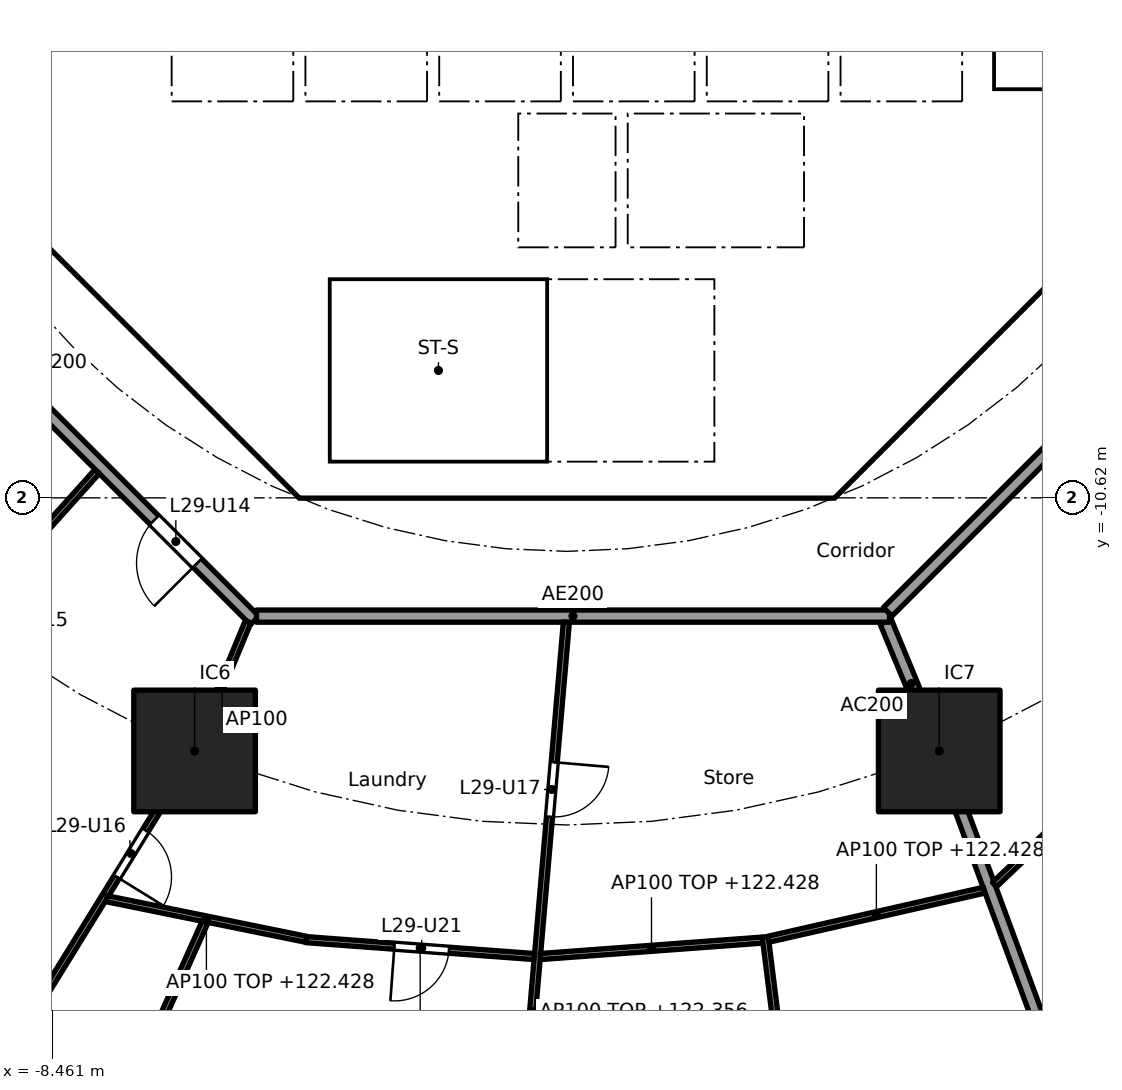
"""IFC4 building model, lengths in metres.
Left out: names, types, materials, properties, quantities, classifications, styles, units other than length and angle.
Written with IfcOpenShell. Run it as: python <this file> out.ifc"""

import sys

from ifc_helpers import new_model, si_unit, direction, frame, frame_2d, origin, origin_2d, place, context, subcontext, project, spatial, polyline, rectangle, outline, extrude, element, fill, save


model = new_model("IFC4")
c1 = context("Model", 3, precision=1e-05, world=origin(), true_north=direction((0.0, 1.0)))
c2 = subcontext(c1, "Body", "Model", "MODEL_VIEW")
j1 = project(units=[si_unit("LENGTHUNIT", "METRE"), si_unit("PLANEANGLEUNIT", "RADIAN")], contexts=[c1])
p1 = place(None, origin())
s1 = spatial("IfcSite", under=j1, at=p1, CompositionType="ELEMENT")
p2 = place(p1, origin())
s2 = spatial("IfcBuilding", under=s1, at=p2, CompositionType="ELEMENT")
p3 = place(p2, frame((0.0, 0.0, 119.6)))
s3 = spatial("IfcBuildingStorey", under=s2, at=p3, CompositionType="ELEMENT", Elevation=119.6)
for number, where, z_axis, x_axis in (
    (1, (-6.123, -14.782, 0.0), (0.0, 0.0, 1.0), (1.0, 0.0, 0.0)),
    (2, (6.123, -14.782, 0.0), (0.0, 0.0, 1.0), (1.0, 0.0, 0.0)),
):
    element("IfcColumn", number, at=place(p3, frame(where, z_axis=z_axis, x_axis=x_axis)), inside=s3, PredefinedType="COLUMN", context=c2, shape_type="SweptSolid", body=[
        extrude(rectangle(XDim=2.0, YDim=2.0, at=origin_2d()), origin(), (0.0, 0.0, 1.0), 3.7),
    ])
p4 = place(p3, frame((-9.988, -4.613, 0.0), z_axis=(0.0, 0.0, 1.0), x_axis=(0.707106781187, -0.707106781187, 0.0)))
e3 = element("IfcWall", 3, at=p4, inside=s3, PredefinedType="SHEAR", context=c2, shape_type="SweptSolid", body=[
    extrude(rectangle(XDim=7.602, YDim=0.6, at=frame_2d((3.801, 0.0))), origin(), (0.0, 0.0, 1.0), 3.44),
])
p5 = place(p4, frame((6.151, 0.0, 0.0)))
e4 = element("IfcOpeningElement", 4, at=p5, cuts=e3, PredefinedType="OPENING", context=c2, shape_type="SweptSolid", body=[
    extrude(rectangle(XDim=1.1, YDim=2.1, at=frame_2d((0.55, 1.05))), frame((0.0, 0.31, 0.0), z_axis=(0.0, -1.0, 0.0), x_axis=(1.0, 0.0, 0.0)), (0.0, 0.0, 1.0), 0.62),
])
p6 = place(p3, frame((4.613, -9.988, 0.0), z_axis=(0.0, 0.0, 1.0), x_axis=(0.707106781187, 0.707106781187, 0.0)))
e5 = element("IfcWall", 5, at=p6, inside=s3, PredefinedType="SHEAR", context=c2, shape_type="SweptSolid", body=[
    extrude(rectangle(XDim=7.602, YDim=0.6, at=frame_2d((3.801, 0.0))), origin(), (0.0, 0.0, 1.0), 3.44),
])
p7 = place(p6, frame((3.201, 0.0, 0.0)))
e6 = element("IfcOpeningElement", 6, at=p7, cuts=e5, PredefinedType="OPENING", context=c2, shape_type="SweptSolid", body=[
    extrude(rectangle(XDim=1.2, YDim=2.1, at=frame_2d((0.6, 1.05))), frame((0.0, 0.31, 0.0), z_axis=(0.0, -1.0, 0.0), x_axis=(1.0, 0.0, 0.0)), (0.0, 0.0, 1.0), 0.62),
])
p8 = place(p3, frame((4.0, -10.025, 0.0), z_axis=(0.0, 0.0, 1.0), x_axis=(0.0, 1.0, 0.0)))
e7 = element("IfcWall", 7, at=p8, inside=s3, PredefinedType="SOLIDWALL", context=c2, shape_type="SweptSolid", body=[
    extrude(rectangle(XDim=3.0, YDim=0.2, at=frame_2d((1.5, 0.0))), origin(), (0.0, 0.0, 1.0), 3.44),
])
p9 = place(p8, frame((0.975, 0.0, 0.0)))
e8 = element("IfcOpeningElement", 8, at=p9, cuts=e7, PredefinedType="OPENING", context=c2, shape_type="SweptSolid", body=[
    extrude(rectangle(XDim=1.1, YDim=2.1, at=frame_2d((0.55, 1.05))), frame((0.0, 0.11, 0.0), z_axis=(0.0, -1.0, 0.0), x_axis=(1.0, 0.0, 0.0)), (0.0, 0.0, 1.0), 0.22),
])
p10 = place(p3, frame((-5.8, -8.227, 0.0), z_axis=(0.0, 0.0, 1.0), x_axis=(0.0, 1.0, 0.0)))
e9 = element("IfcWall", 9, at=p10, inside=s3, PredefinedType="PARTITIONING", context=c2, shape_type="SweptSolid", body=[
    extrude(rectangle(XDim=3.927, YDim=0.15, at=frame_2d((1.963, 0.0))), origin(), (0.0, 0.0, 1.0), 3.44),
])
p11 = place(p10, frame((1.476, 0.0, 0.0)))
e10 = element("IfcOpeningElement", 10, at=p11, cuts=e9, PredefinedType="OPENING", context=c2, shape_type="SweptSolid", body=[
    extrude(rectangle(XDim=0.9, YDim=2.1, at=frame_2d((0.45, 1.05))), frame((0.0, 0.085, 0.0), z_axis=(0.0, -1.0, 0.0), x_axis=(1.0, 0.0, 0.0)), (0.0, 0.0, 1.0), 0.17),
])
p12 = place(p3, frame((4.0, -6.5, 0.0), z_axis=(0.0, 0.0, 1.0), x_axis=(0.0, 1.0, 0.0)))
e11 = element("IfcWall", 11, at=p12, inside=s3, PredefinedType="SOLIDWALL", context=c2, shape_type="SweptSolid", body=[
    extrude(rectangle(XDim=2.2, YDim=0.2, at=frame_2d((1.1, 0.0))), origin(), (0.0, 0.0, 1.0), 3.44),
])
p13 = place(p12, frame((0.55, 0.0, 0.0)))
e12 = element("IfcOpeningElement", 12, at=p13, cuts=e11, PredefinedType="OPENING", context=c2, shape_type="SweptSolid", body=[
    extrude(rectangle(XDim=1.1, YDim=2.1, at=frame_2d((0.55, 1.05))), frame((0.0, 0.11, 0.0), z_axis=(0.0, -1.0, 0.0), x_axis=(1.0, 0.0, 0.0)), (0.0, 0.0, 1.0), 0.22),
])
p14 = place(p3, frame((-4.0, -6.5, 0.0), z_axis=(0.0, 0.0, 1.0), x_axis=(0.0, 1.0, 0.0)))
e13 = element("IfcWall", 13, at=p14, inside=s3, PredefinedType="SOLIDWALL", context=c2, shape_type="SweptSolid", body=[
    extrude(rectangle(XDim=2.2, YDim=0.2, at=frame_2d((1.1, 0.0))), origin(), (0.0, 0.0, 1.0), 3.44),
])
p15 = place(p14, frame((0.65, 0.0, 0.0)))
e14 = element("IfcOpeningElement", 14, at=p15, cuts=e13, PredefinedType="OPENING", context=c2, shape_type="SweptSolid", body=[
    extrude(rectangle(XDim=0.9, YDim=2.1, at=frame_2d((0.45, 1.05))), frame((0.0, 0.11, 0.0), z_axis=(0.0, -1.0, 0.0), x_axis=(1.0, 0.0, 0.0)), (0.0, 0.0, 1.0), 0.22),
])
p16 = place(p3, origin())
e15 = element("IfcWall", 15, at=p16, inside=s3, PredefinedType="SHEAR", context=c2, shape_type="SweptSolid", body=[
    extrude(outline(polyline([(-4.152, -10.025), (4.152, -10.025), (4.401, -9.776), (4.825, -10.2), (4.401, -10.625), (-4.401, -10.625), (-4.825, -10.2), (-4.401, -9.776), (-4.152, -10.025)])), origin(), (0.0, 0.0, 1.0), 3.44),
])
for number, where, z_axis, x_axis in (
    (16, (-0.9, -6.5, 0.0), (0.0, 0.0, 1.0), (0.0, 1.0, 0.0)),
    (17, (0.9, -6.5, 0.0), (0.0, 0.0, 1.0), (0.0, 1.0, 0.0)),
):
    element("IfcWall", number, at=place(p3, frame(where, z_axis=z_axis, x_axis=x_axis)), inside=s3, PredefinedType="SOLIDWALL", context=c2, shape_type="SweptSolid", body=[
        extrude(rectangle(XDim=2.2, YDim=0.2, at=frame_2d((1.1, 0.0))), origin(), (0.0, 0.0, 1.0), 3.44),
    ])
p17 = place(p3, origin())
e18 = element("IfcWall", 18, at=p17, inside=s3, PredefinedType="SOLIDWALL", context=c2, shape_type="SweptSolid", body=[
    extrude(outline(polyline([(-6.7, -2.1), (-6.5, -2.1), (-6.5, -4.1), (-4.5, -4.1), (-4.5, -2.1), (-4.3, -2.1), (-4.3, -4.1), (-2.3, -4.1), (-2.3, -2.1), (-2.1, -2.1), (-2.1, -4.1), (-0.1, -4.1), (-0.1, -2.1), (0.1, -2.1), (0.1, -4.1), (2.1, -4.1), (2.1, -2.1), (2.3, -2.1), (2.3, -4.1), (4.3, -4.1), (4.3, -2.1), (4.5, -2.1), (4.5, -4.1), (6.5, -4.1), (6.5, -2.1), (6.7, -2.1), (6.7, -4.3), (-6.7, -4.3), (-6.7, -2.1)])), origin(), (0.0, 0.0, 1.0), 3.44),
])
p18 = place(p3, frame((-10.025, -4.0, 0.0), z_axis=(0.0, 0.0, 1.0), x_axis=(1.0, 0.0, 0.0)))
e19 = element("IfcWall", 19, at=p18, inside=s3, PredefinedType="PARTITIONING", context=c2, shape_type="SweptSolid", body=[
    extrude(rectangle(XDim=3.325, YDim=0.2, at=frame_2d((1.662, 0.0))), origin(), (0.0, 0.0, 1.0), 3.44),
])
p19 = place(p3, origin())
e20 = element("IfcWall", 20, at=p19, inside=s3, PredefinedType="SOLIDWALL", context=c2, shape_type="SweptSolid", body=[
    extrude(outline(polyline([(-3.9, -10.025), (-4.1, -10.025), (-4.1, -7.025), (-3.9, -7.025), (-3.9, -10.025)])), origin(), (0.0, 0.0, 1.0), 3.44),
])
p20 = place(p3, origin())
e21 = element("IfcWall", 21, at=p20, inside=s3, PredefinedType="SOLIDWALL", context=c2, shape_type="SweptSolid", body=[
    extrude(outline(polyline([(4.1, -7.025), (-4.1, -7.025), (-4.1, -6.5), (4.1, -6.5), (4.1, -7.025)])), origin(), (0.0, 0.0, 1.0), 3.44),
])
p21 = place(p3, origin())
e22 = element("IfcWall", 22, at=p21, inside=s3, PredefinedType="SOLIDWALL", context=c2, shape_type="SweptSolid", body=[
    extrude(outline(polyline([(7.025, -3.9), (6.7, -3.9), (6.7, 3.9), (7.025, 3.9), (7.025, -3.9)])), origin(), (0.0, 0.0, 1.0), 3.44),
])
p22 = place(p3, origin())
e23 = element("IfcWall", 23, at=p22, inside=s3, PredefinedType="SOLIDWALL", context=c2, shape_type="SweptSolid", body=[
    extrude(outline(polyline([(10.025, -4.1), (6.7, -4.1), (6.7, -3.9), (10.025, -3.9), (10.025, -4.1)])), origin(), (0.0, 0.0, 1.0), 3.44),
])
p23 = place(p3, frame((5.243, -12.657, 0.0), z_axis=(0.0, 0.0, 1.0), x_axis=(0.38273085373, -0.923859888513, 0.0)))
e24 = element("IfcWall", 24, at=p23, inside=s3, PredefinedType="PARTITIONING", context=c2, shape_type="SweptSolid", body=[
    extrude(rectangle(XDim=2.199, YDim=0.2, at=frame_2d((1.1, 0.0))), origin(), (0.0, 0.0, 1.0), 3.44),
])
p24 = place(p3, frame((6.14, -14.829, 0.0), z_axis=(0.0, 0.0, 1.0), x_axis=(0.346169582481, -0.938171956608, 0.0)))
e25 = element("IfcWall", 25, at=p24, inside=s3, PredefinedType="PARTITIONING", context=c2, shape_type="SweptSolid", body=[
    extrude(rectangle(XDim=14.354, YDim=0.2, at=frame_2d((7.177, 0.0))), origin(), (0.0, 0.0, 1.0), 2.828),
])
p25 = place(p3, frame((-12.635, -5.134, 0.0), z_axis=(0.0, 0.0, 1.0), x_axis=(0.707106781187, -0.707106781187, 0.0)))
e26 = element("IfcWall", 26, at=p25, inside=s3, PredefinedType="PARTITIONING", context=c2, shape_type="SweptSolid", body=[
    extrude(rectangle(XDim=10.609, YDim=0.2, at=frame_2d((5.305, 0.0))), origin(), (0.0, 0.0, 1.0), 3.44),
])
p26 = place(p25, frame((8.274, 0.0, 0.0)))
e27 = element("IfcOpeningElement", 27, at=p26, cuts=e26, PredefinedType="OPENING", context=c2, shape_type="SweptSolid", body=[
    extrude(rectangle(XDim=1.0, YDim=2.1, at=frame_2d((0.5, 1.05))), frame((0.0, 0.11, 0.0), z_axis=(0.0, -1.0, 0.0), x_axis=(1.0, 0.0, 0.0)), (0.0, 0.0, 1.0), 0.22),
])
p27 = place(p3, frame((-5.104, -12.565, 0.0), z_axis=(0.0, 0.0, 1.0), x_axis=(1.0, 0.0, 0.0)))
e28 = element("IfcWall", 28, at=p27, inside=s3, PredefinedType="PARTITIONING", context=c2, shape_type="SweptSolid", body=[
    extrude(rectangle(XDim=10.409, YDim=0.2, at=frame_2d((5.205, 0.0))), origin(), (0.0, 0.0, 1.0), 3.44),
])
p28 = place(p3, frame((5.275, -12.494, 0.0), z_axis=(0.0, 0.0, 1.0), x_axis=(0.707106781187, 0.707106781187, 0.0)))
e29 = element("IfcWall", 29, at=p28, inside=s3, PredefinedType="PARTITIONING", context=c2, shape_type="SweptSolid", body=[
    extrude(rectangle(XDim=10.409, YDim=0.2, at=frame_2d((5.205, 0.0))), origin(), (0.0, 0.0, 1.0), 3.44),
])
p29 = place(p3, frame((-7.725, -10.186, 0.0), z_axis=(0.0, 0.0, 1.0), x_axis=(-0.668498346565, -0.743713628112, 0.0)))
e30 = element("IfcWall", 30, at=p29, inside=s3, PredefinedType="PARTITIONING", context=c2, shape_type="SweptSolid", body=[
    extrude(rectangle(XDim=11.919, YDim=0.1, at=frame_2d((5.959, 0.0))), origin(), (0.0, 0.0, 1.0), 2.756),
])
p30 = place(p29, frame((2.106, 0.0, 0.0)))
e31 = element("IfcOpeningElement", 31, at=p30, cuts=e30, PredefinedType="OPENING", context=c2, shape_type="SweptSolid", body=[
    extrude(rectangle(XDim=0.9, YDim=2.1, at=frame_2d((0.45, 1.05))), frame((0.0, 0.06, 0.0), z_axis=(0.0, -1.0, 0.0), x_axis=(1.0, 0.0, 0.0)), (0.0, 0.0, 1.0), 0.12),
])
p31 = place(p29, frame((8.041, 0.0, 0.0)))
e32 = element("IfcOpeningElement", 32, at=p31, cuts=e30, PredefinedType="OPENING", context=c2, shape_type="SweptSolid", body=[
    extrude(rectangle(XDim=0.9, YDim=2.1, at=frame_2d((0.45, 1.05))), frame((0.0, 0.06, 0.0), z_axis=(0.0, -1.0, 0.0), x_axis=(1.0, 0.0, 0.0)), (0.0, 0.0, 1.0), 0.12),
])
p32 = place(p3, frame((-5.243, -12.657, 0.0), z_axis=(0.0, 0.0, 1.0), x_axis=(-0.382811769845, -0.923826362943, 0.0)))
e33 = element("IfcWall", 33, at=p32, inside=s3, PredefinedType="PARTITIONING", context=c2, shape_type="SweptSolid", body=[
    extrude(rectangle(XDim=2.25, YDim=0.1, at=frame_2d((1.125, 0.0))), origin(), (0.0, 0.0, 1.0), 3.44),
])
p33 = place(p3, frame((-6.149, -14.825, 0.0), z_axis=(0.0, 0.0, 1.0), x_axis=(-0.525396393596, -0.850857584791, 0.0)))
e34 = element("IfcWall", 34, at=p33, inside=s3, PredefinedType="PARTITIONING", context=c2, shape_type="SweptSolid", body=[
    extrude(rectangle(XDim=9.643, YDim=0.1, at=frame_2d((4.822, 0.0))), origin(), (0.0, 0.0, 1.0), 3.44),
])
p34 = place(p33, frame((1.485, 0.0, 0.0)))
e35 = element("IfcOpeningElement", 35, at=p34, cuts=e34, PredefinedType="OPENING", context=c2, shape_type="SweptSolid", body=[
    extrude(rectangle(XDim=0.9, YDim=2.1, at=frame_2d((0.45, 1.05))), frame((0.0, 0.06, 0.0), z_axis=(0.0, -1.0, 0.0), x_axis=(1.0, 0.0, 0.0)), (0.0, 0.0, 1.0), 0.12),
])
p35 = place(p33, frame((5.744, 0.0, 0.0)))
e36 = element("IfcOpeningElement", 36, at=p35, cuts=e34, PredefinedType="OPENING", context=c2, shape_type="SweptSolid", body=[
    extrude(rectangle(XDim=0.9, YDim=2.1, at=frame_2d((0.45, 1.05))), frame((0.0, 0.06, 0.0), z_axis=(0.0, -1.0, 0.0), x_axis=(1.0, 0.0, 0.0)), (0.0, 0.0, 1.0), 0.12),
])
p36 = place(p3, frame((-7.568, -17.212, 0.0), z_axis=(0.0, 0.0, 1.0), x_axis=(0.979967079473, -0.199159541946, 0.0)))
e37 = element("IfcWall", 37, at=p36, inside=s3, PredefinedType="PARTITIONING", context=c2, shape_type="SweptSolid", body=[
    extrude(rectangle(XDim=3.347, YDim=0.1, at=frame_2d((1.673, 0.0))), origin(), (0.0, 0.0, 1.0), 2.828),
])
p37 = place(p3, frame((-5.949, -17.591, 0.0), z_axis=(0.0, 0.0, 1.0), x_axis=(-0.40838467696, -0.912809923053, 0.0)))
e38 = element("IfcWall", 38, at=p37, inside=s3, PredefinedType="PARTITIONING", context=c2, shape_type="SweptSolid", body=[
    extrude(rectangle(XDim=14.665, YDim=0.1, at=frame_2d((7.333, 0.0))), origin(), (0.0, 0.0, 1.0), 2.905),
])
p38 = place(p37, frame((10.334, 0.0, 0.0)))
e39 = element("IfcOpeningElement", 39, at=p38, cuts=e38, PredefinedType="OPENING", context=c2, shape_type="SweptSolid", body=[
    extrude(rectangle(XDim=0.9, YDim=2.1, at=frame_2d((0.45, 1.05))), frame((0.0, 0.06, 0.0), z_axis=(0.0, -1.0, 0.0), x_axis=(1.0, 0.0, 0.0)), (0.0, 0.0, 1.0), 0.12),
])
p39 = place(p3, frame((-4.29, -17.885, 0.0), z_axis=(0.0, 0.0, 1.0), x_axis=(0.997272353708, -0.073809569363, 0.0)))
e40 = element("IfcWall", 40, at=p39, inside=s3, PredefinedType="PARTITIONING", context=c2, shape_type="SweptSolid", body=[
    extrude(rectangle(XDim=3.764, YDim=0.1, at=frame_2d((1.882, 0.0))), origin(), (0.0, 0.0, 1.0), 2.828),
])
p40 = place(p39, frame((1.457, 0.0, 0.0)))
e41 = element("IfcOpeningElement", 41, at=p40, cuts=e40, PredefinedType="OPENING", context=c2, shape_type="SweptSolid", body=[
    extrude(rectangle(XDim=0.9, YDim=2.1, at=frame_2d((0.45, 1.05))), frame((0.0, 0.06, 0.0), z_axis=(0.0, -1.0, 0.0), x_axis=(1.0, 0.0, 0.0)), (0.0, 0.0, 1.0), 0.12),
])
p41 = place(p3, frame((-0.009, -12.664, 0.0), z_axis=(0.0, 0.0, 1.0), x_axis=(-0.086441225464, -0.996256952066, 0.0)))
e42 = element("IfcWall", 42, at=p41, inside=s3, PredefinedType="PARTITIONING", context=c2, shape_type="SweptSolid", body=[
    extrude(rectangle(XDim=12.862, YDim=0.1, at=frame_2d((6.431, 0.0))), origin(), (0.0, 0.0, 1.0), 2.756),
])
p42 = place(p41, frame((2.312, 0.0, 0.0)))
e43 = element("IfcOpeningElement", 43, at=p42, cuts=e42, PredefinedType="OPENING", context=c2, shape_type="SweptSolid", body=[
    extrude(rectangle(XDim=0.9, YDim=2.1, at=frame_2d((0.45, 1.05))), frame((0.0, 0.06, 0.0), z_axis=(0.0, -1.0, 0.0), x_axis=(1.0, 0.0, 0.0)), (0.0, 0.0, 1.0), 0.12),
])
p43 = place(p41, frame((8.718, 0.0, 0.0)))
e44 = element("IfcOpeningElement", 44, at=p43, cuts=e42, PredefinedType="OPENING", context=c2, shape_type="SweptSolid", body=[
    extrude(rectangle(XDim=0.9, YDim=2.1, at=frame_2d((0.45, 1.05))), frame((0.0, 0.06, 0.0), z_axis=(0.0, -1.0, 0.0), x_axis=(1.0, 0.0, 0.0)), (0.0, 0.0, 1.0), 0.12),
])
p44 = place(p3, frame((-0.436, -18.163, 0.0), z_axis=(0.0, 0.0, 1.0), x_axis=(0.997271025958, 0.073827506966, 0.0)))
e45 = element("IfcWall", 45, at=p44, inside=s3, PredefinedType="PARTITIONING", context=c2, shape_type="SweptSolid", body=[
    extrude(rectangle(XDim=3.664, YDim=0.1, at=frame_2d((1.832, 0.0))), origin(), (0.0, 0.0, 1.0), 2.828),
])
p45 = place(p3, frame((3.262, -17.839, 0.0), z_axis=(0.0, 0.0, 1.0), x_axis=(0.124074750982, -0.992272873845, 0.0)))
e46 = element("IfcWall", 46, at=p45, inside=s3, PredefinedType="PARTITIONING", context=c2, shape_type="SweptSolid", body=[
    extrude(rectangle(XDim=13.516, YDim=0.1, at=frame_2d((6.758, 0.0))), origin(), (0.0, 0.0, 1.0), 2.828),
])
p46 = place(p45, frame((3.078, 0.0, 0.0)))
e47 = element("IfcOpeningElement", 47, at=p46, cuts=e46, PredefinedType="OPENING", context=c2, shape_type="SweptSolid", body=[
    extrude(rectangle(XDim=0.9, YDim=2.1, at=frame_2d((0.45, 1.05))), frame((0.0, 0.06, 0.0), z_axis=(0.0, -1.0, 0.0), x_axis=(1.0, 0.0, 0.0)), (0.0, 0.0, 1.0), 0.12),
])
p47 = place(p45, frame((9.811, 0.0, 0.0)))
e48 = element("IfcOpeningElement", 48, at=p47, cuts=e46, PredefinedType="OPENING", context=c2, shape_type="SweptSolid", body=[
    extrude(rectangle(XDim=0.9, YDim=2.1, at=frame_2d((0.45, 1.05))), frame((0.0, 0.06, 0.0), z_axis=(0.0, -1.0, 0.0), x_axis=(1.0, 0.0, 0.0)), (0.0, 0.0, 1.0), 0.12),
])
p48 = place(p3, frame((3.317, -17.878, 0.0), z_axis=(0.0, 0.0, 1.0), x_axis=(0.975095905288, 0.221783623135, 0.0)))
e49 = element("IfcWall", 49, at=p48, inside=s3, PredefinedType="PARTITIONING", context=c2, shape_type="SweptSolid", body=[
    extrude(rectangle(XDim=3.636, YDim=0.1, at=frame_2d((1.818, 0.0))), origin(), (0.0, 0.0, 1.0), 2.828),
])
p49 = place(p3, frame((7.032, -16.98, 0.0), z_axis=(0.0, 0.0, 1.0), x_axis=(0.723709759148, 0.690104473622, 0.0)))
e50 = element("IfcWall", 50, at=p49, inside=s3, PredefinedType="PARTITIONING", context=c2, shape_type="SweptSolid", body=[
    extrude(rectangle(XDim=4.286, YDim=0.1, at=frame_2d((2.143, 0.0))), origin(), (0.0, 0.0, 1.0), 2.828),
])
p50 = place(p13, origin())
e51 = element("IfcDoor", 51, at=p50, inside=s3, OperationType="DOUBLE_DOOR_SLIDING", PredefinedType="DOOR", context=c2, shape_type="SweptSolid", body=[
    extrude(rectangle(XDim=1.1, YDim=2.1, at=frame_2d((0.55, 1.05))), frame((0.0, 0.025, 0.0), z_axis=(0.0, -1.0, 0.0), x_axis=(1.0, 0.0, 0.0)), (0.0, 0.0, 1.0), 0.05),
])
fill(e12, e51)
p51 = place(p9, origin())
e52 = element("IfcDoor", 52, at=p51, inside=s3, OperationType="SINGLE_SWING_LEFT", PredefinedType="DOOR", context=c2, shape_type="SweptSolid", body=[
    extrude(rectangle(XDim=1.1, YDim=2.1, at=frame_2d((0.55, 1.05))), frame((0.0, 0.025, 0.0), z_axis=(0.0, -1.0, 0.0), x_axis=(1.0, 0.0, 0.0)), (0.0, 0.0, 1.0), 0.05),
])
fill(e8, e52)
p52 = place(p11, origin())
e53 = element("IfcDoor", 53, at=p52, inside=s3, OperationType="SINGLE_SWING_LEFT", PredefinedType="DOOR", context=c2, shape_type="SweptSolid", body=[
    extrude(rectangle(XDim=0.9, YDim=2.1, at=frame_2d((0.45, 1.05))), frame((0.0, 0.025, 0.0), z_axis=(0.0, -1.0, 0.0), x_axis=(1.0, 0.0, 0.0)), (0.0, 0.0, 1.0), 0.05),
])
fill(e10, e53)
p53 = place(p15, frame((0.9, 0.0, 0.0), x_axis=(-1.0, 0.0, 0.0)))
e54 = element("IfcDoor", 54, at=p53, inside=s3, OperationType="SINGLE_SWING_RIGHT", PredefinedType="DOOR", context=c2, shape_type="SweptSolid", body=[
    extrude(rectangle(XDim=0.9, YDim=2.1, at=frame_2d((0.45, 1.05))), frame((0.0, 0.025, 0.0), z_axis=(0.0, -1.0, 0.0), x_axis=(1.0, 0.0, 0.0)), (0.0, 0.0, 1.0), 0.05),
])
fill(e14, e54)
p54 = place(p7, origin())
e55 = element("IfcDoor", 55, at=p54, inside=s3, OperationType="SINGLE_SWING_RIGHT", PredefinedType="DOOR", context=c2, shape_type="SweptSolid", body=[
    extrude(rectangle(XDim=1.2, YDim=2.1, at=frame_2d((0.6, 1.05))), frame((0.0, 0.025, 0.0), z_axis=(0.0, -1.0, 0.0), x_axis=(1.0, 0.0, 0.0)), (0.0, 0.0, 1.0), 0.05),
])
fill(e6, e55)
p55 = place(p5, origin())
e56 = element("IfcDoor", 56, at=p55, inside=s3, OperationType="SINGLE_SWING_RIGHT", PredefinedType="DOOR", context=c2, shape_type="SweptSolid", body=[
    extrude(rectangle(XDim=1.1, YDim=2.1, at=frame_2d((0.55, 1.05))), frame((0.0, 0.025, 0.0), z_axis=(0.0, -1.0, 0.0), x_axis=(1.0, 0.0, 0.0)), (0.0, 0.0, 1.0), 0.05),
])
fill(e4, e56)
p56 = place(p26, frame((1.0, 0.0, 0.0), x_axis=(-1.0, 0.0, 0.0)))
e57 = element("IfcDoor", 57, at=p56, inside=s3, OperationType="SINGLE_SWING_LEFT", PredefinedType="DOOR", context=c2, shape_type="SweptSolid", body=[
    extrude(rectangle(XDim=1.0, YDim=2.1, at=frame_2d((0.5, 1.05))), frame((0.0, 0.025, 0.0), z_axis=(0.0, -1.0, 0.0), x_axis=(1.0, 0.0, 0.0)), (0.0, 0.0, 1.0), 0.05),
])
fill(e27, e57)
p57 = place(p34, origin())
e58 = element("IfcDoor", 58, at=p57, inside=s3, OperationType="SINGLE_SWING_RIGHT", PredefinedType="DOOR", context=c2, shape_type="SweptSolid", body=[
    extrude(rectangle(XDim=0.9, YDim=2.1, at=frame_2d((0.45, 1.05))), frame((0.0, 0.025, 0.0), z_axis=(0.0, -1.0, 0.0), x_axis=(1.0, 0.0, 0.0)), (0.0, 0.0, 1.0), 0.05),
])
fill(e35, e58)
p58 = place(p42, origin())
e59 = element("IfcDoor", 59, at=p58, inside=s3, OperationType="SINGLE_SWING_LEFT", PredefinedType="DOOR", context=c2, shape_type="SweptSolid", body=[
    extrude(rectangle(XDim=0.9, YDim=2.1, at=frame_2d((0.45, 1.05))), frame((0.0, 0.025, 0.0), z_axis=(0.0, -1.0, 0.0), x_axis=(1.0, 0.0, 0.0)), (0.0, 0.0, 1.0), 0.05),
])
fill(e43, e59)
p59 = place(p40, frame((0.9, 0.0, 0.0), x_axis=(-1.0, 0.0, 0.0)))
e60 = element("IfcDoor", 60, at=p59, inside=s3, OperationType="SINGLE_SWING_RIGHT", PredefinedType="DOOR", context=c2, shape_type="SweptSolid", body=[
    extrude(rectangle(XDim=0.9, YDim=2.1, at=frame_2d((0.45, 1.05))), frame((0.0, 0.025, 0.0), z_axis=(0.0, -1.0, 0.0), x_axis=(1.0, 0.0, 0.0)), (0.0, 0.0, 1.0), 0.05),
])
fill(e41, e60)
save(model, sys.argv[1])
